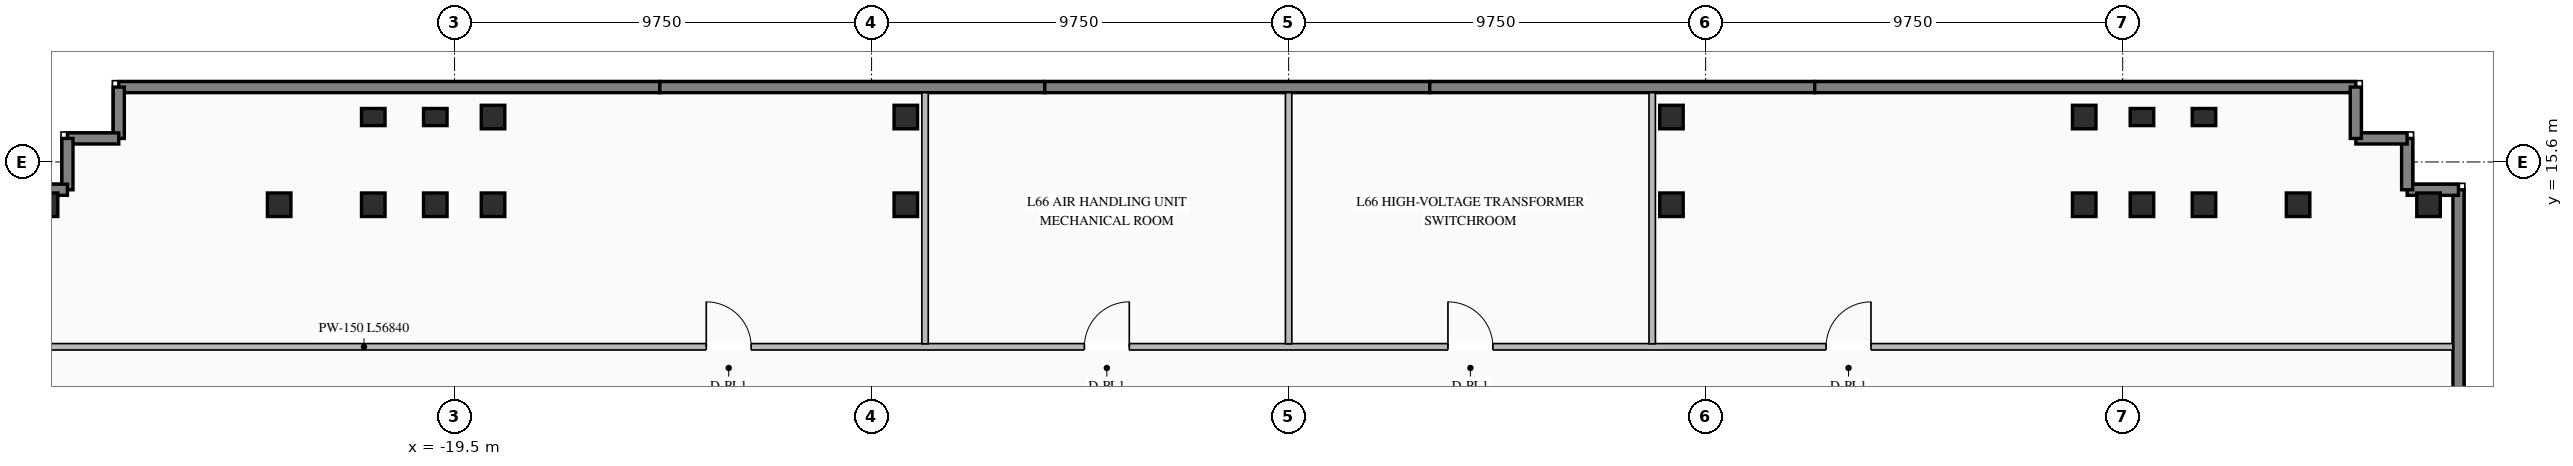
"""IFC4 building model, lengths in metres.
Left out: names, types, materials, properties, quantities, classifications, styles, units other than length and angle.
Written with IfcOpenShell. Run it as: python <this file> out.ifc"""

import sys

from ifc_helpers import new_model, si_unit, direction, frame, frame_2d, origin, origin_2d, place, context, subcontext, project, spatial, rectangle, i_section, extrude, element, fill, save


model = new_model("IFC4")
c1 = context("Model", 3, precision=1e-05, world=origin(), true_north=direction((0.0, 1.0)))
c2 = subcontext(c1, "Body", "Model", "MODEL_VIEW")
j1 = project(units=[si_unit("LENGTHUNIT", "METRE"), si_unit("PLANEANGLEUNIT", "RADIAN")], contexts=[c1])
p1 = place(None, origin())
s1 = spatial("IfcSite", under=j1, at=p1, CompositionType="ELEMENT")
p2 = place(p1, origin())
s2 = spatial("IfcBuilding", under=s1, at=p2, CompositionType="ELEMENT")
p3 = place(p2, frame((0.0, 0.0, 243.0)))
s3 = spatial("IfcBuildingStorey", under=s2, at=p3, CompositionType="ELEMENT", Elevation=243.0)
for number, where, z_axis, x_axis in (
    (1, (-21.4, 14.6, 0.0), (0.0, 0.0, 1.0), (1.0, 0.0, 0.0)),
    (2, (-19.95, 14.6, 0.0), (0.0, 0.0, 1.0), (1.0, 0.0, 0.0)),
    (3, (-18.6, 14.6, 0.0), (0.0, 0.0, 1.0), (1.0, 0.0, 0.0)),
    (4, (-8.95, 14.6, 0.0), (0.0, 0.0, 1.0), (1.0, 0.0, 0.0)),
    (5, (8.95, 14.6, 0.0), (0.0, 0.0, 1.0), (1.0, 0.0, 0.0)),
    (6, (18.6, 14.6, 0.0), (0.0, 0.0, 1.0), (1.0, 0.0, 0.0)),
    (7, (19.95, 14.6, 0.0), (0.0, 0.0, 1.0), (1.0, 0.0, 0.0)),
    (8, (21.4, 14.6, 0.0), (0.0, 0.0, 1.0), (1.0, 0.0, 0.0)),
    (9, (-23.6, 14.6, 0.0), (0.0, 0.0, 1.0), (1.0, 0.0, 0.0)),
    (10, (23.6, 14.6, 0.0), (0.0, 0.0, 1.0), (1.0, 0.0, 0.0)),
    (11, (-18.6, 16.65, 0.0), (0.0, 0.0, 1.0), (1.0, 0.0, 0.0)),
    (12, (-8.95, 16.65, 0.0), (0.0, 0.0, 1.0), (1.0, 0.0, 0.0)),
    (13, (8.95, 16.65, 0.0), (0.0, 0.0, 1.0), (1.0, 0.0, 0.0)),
    (14, (18.6, 16.65, 0.0), (0.0, 0.0, 1.0), (1.0, 0.0, 0.0)),
    (15, (-29.05, 14.6, 0.0), (0.0, 0.0, 1.0), (1.0, 0.0, 0.0)),
    (16, (26.65, 14.6, 0.0), (0.0, 0.0, 1.0), (1.0, 0.0, 0.0)),
):
    element("IfcColumn", number, at=place(p3, frame(where, z_axis=z_axis, x_axis=x_axis)), inside=s3, PredefinedType="COLUMN", context=c2, shape_type="SweptSolid", body=[
        extrude(i_section(OverallWidth=0.55, OverallDepth=0.55, WebThickness=0.024, FlangeThickness=0.036, at=origin_2d()), origin(), (0.0, 0.0, 1.0), 4.5),
    ])
for number, where, z_axis, x_axis in (
    (17, (-21.4, 16.65, 0.0), (0.0, 0.0, 1.0), (1.0, 0.0, 0.0)),
    (18, (-19.95, 16.65, 0.0), (0.0, 0.0, 1.0), (1.0, 0.0, 0.0)),
    (19, (19.95, 16.65, 0.0), (0.0, 0.0, 1.0), (1.0, 0.0, 0.0)),
    (20, (21.4, 16.65, 0.0), (0.0, 0.0, 1.0), (1.0, 0.0, 0.0)),
):
    element("IfcColumn", number, at=place(p3, frame(where, z_axis=z_axis, x_axis=x_axis)), inside=s3, PredefinedType="PILASTER", context=c2, shape_type="SweptSolid", body=[
        extrude(rectangle(XDim=0.55, YDim=0.4, at=origin_2d()), origin(), (0.0, 0.0, 1.0), 4.5),
    ])
p4 = place(p3, frame((-27.35, 17.35, 0.0), z_axis=(0.0, 0.0, 1.0), x_axis=(1.0, 0.0, 0.0)))
e21 = element("IfcWall", 21, at=p4, inside=s3, PredefinedType="STANDARD", context=c2, shape_type="SweptSolid", body=[
    extrude(rectangle(XDim=12.65, YDim=0.26, at=frame_2d((6.325, 0.0))), origin(), (0.0, 0.0, 1.0), 4.2),
])
for number, where, z_axis, x_axis in (
    (22, (-14.7, 17.35, 0.0), (0.0, 0.0, 1.0), (1.0, 0.0, 0.0)),
    (23, (-5.7, 17.35, 0.0), (0.0, 0.0, 1.0), (1.0, 0.0, 0.0)),
):
    element("IfcWall", number, at=place(p3, frame(where, z_axis=z_axis, x_axis=x_axis)), inside=s3, PredefinedType="STANDARD", context=c2, shape_type="SweptSolid", body=[
        extrude(rectangle(XDim=9.0, YDim=0.26, at=frame_2d((4.5, 0.0))), origin(), (0.0, 0.0, 1.0), 4.2),
    ])
p5 = place(p3, frame((3.3, 17.35, 0.0), z_axis=(0.0, 0.0, 1.0), x_axis=(1.0, 0.0, 0.0)))
e24 = element("IfcWall", 24, at=p5, inside=s3, PredefinedType="STANDARD", context=c2, shape_type="SweptSolid", body=[
    extrude(rectangle(XDim=9.0, YDim=0.26, at=frame_2d((4.5, 0.0))), origin(), (0.0, 0.0, 1.0), 2.395),
])
p6 = place(p3, frame((12.3, 17.35, 0.0), z_axis=(0.0, 0.0, 1.0), x_axis=(1.0, 0.0, 0.0)))
e25 = element("IfcWall", 25, at=p6, inside=s3, PredefinedType="STANDARD", context=c2, shape_type="SweptSolid", body=[
    extrude(rectangle(XDim=12.65, YDim=0.26, at=frame_2d((6.325, 0.0))), origin(), (0.0, 0.0, 1.0), 2.395),
])
p7 = place(p3, frame((27.35, 14.95, 0.0), z_axis=(0.0, 0.0, 1.0), x_axis=(0.0, -1.0, 0.0)))
e26 = element("IfcWall", 26, at=p7, inside=s3, PredefinedType="STANDARD", context=c2, shape_type="SweptSolid", body=[
    extrude(rectangle(XDim=15.85, YDim=0.26, at=frame_2d((7.925, 0.0))), origin(), (0.0, 0.0, 1.0), 4.2),
])
p8 = place(p3, frame((27.35, 14.95, 0.0), z_axis=(0.0, 0.0, 1.0), x_axis=(-1.0, 0.0, 0.0)))
e27 = element("IfcWall", 27, at=p8, inside=s3, PredefinedType="STANDARD", context=c2, shape_type="SweptSolid", body=[
    extrude(rectangle(XDim=1.2, YDim=0.26, at=frame_2d((0.6, 0.0))), origin(), (0.0, 0.0, 1.0), 2.395),
])
for number, where, z_axis, x_axis in (
    (28, (26.15, 14.95, 0.0), (0.0, 0.0, 1.0), (0.0, 1.0, 0.0)),
    (29, (26.15, 16.15, 0.0), (0.0, 0.0, 1.0), (-1.0, 0.0, 0.0)),
):
    element("IfcWall", number, at=place(p3, frame(where, z_axis=z_axis, x_axis=x_axis)), inside=s3, PredefinedType="STANDARD", context=c2, shape_type="SweptSolid", body=[
        extrude(rectangle(XDim=1.2, YDim=0.26, at=frame_2d((0.6, 0.0))), origin(), (0.0, 0.0, 1.0), 2.395),
    ])
p9 = place(p3, frame((24.95, 16.15, 0.0), z_axis=(0.0, 0.0, 1.0), x_axis=(0.0, 1.0, 0.0)))
e30 = element("IfcWall", 30, at=p9, inside=s3, PredefinedType="STANDARD", context=c2, shape_type="SweptSolid", body=[
    extrude(rectangle(XDim=1.2, YDim=0.26, at=frame_2d((0.6, 0.0))), origin(), (0.0, 0.0, 1.0), 2.395),
])
p10 = place(p3, frame((-27.35, 17.35, 0.0), z_axis=(0.0, 0.0, 1.0), x_axis=(0.0, -1.0, 0.0)))
e31 = element("IfcWall", 31, at=p10, inside=s3, PredefinedType="STANDARD", context=c2, shape_type="SweptSolid", body=[
    extrude(rectangle(XDim=1.2, YDim=0.26, at=frame_2d((0.6, 0.0))), origin(), (0.0, 0.0, 1.0), 4.2),
])
for number, where, z_axis, x_axis in (
    (32, (-27.35, 16.15, 0.0), (0.0, 0.0, 1.0), (-1.0, 0.0, 0.0)),
    (33, (-28.55, 16.15, 0.0), (0.0, 0.0, 1.0), (0.0, -1.0, 0.0)),
    (34, (-28.55, 14.95, 0.0), (0.0, 0.0, 1.0), (-1.0, 0.0, 0.0)),
):
    element("IfcWall", number, at=place(p3, frame(where, z_axis=z_axis, x_axis=x_axis)), inside=s3, PredefinedType="STANDARD", context=c2, shape_type="SweptSolid", body=[
        extrude(rectangle(XDim=1.2, YDim=0.26, at=frame_2d((0.6, 0.0))), origin(), (0.0, 0.0, 1.0), 4.2),
    ])
p11 = place(p3, frame((-29.62, 11.28, 0.0), z_axis=(0.0, 0.0, 1.0), x_axis=(1.0, 0.0, 0.0)))
e35 = element("IfcWall", 35, at=p11, inside=s3, PredefinedType="STANDARD", context=c2, shape_type="SweptSolid", body=[
    extrude(rectangle(XDim=56.84, YDim=0.15, at=frame_2d((28.42, 0.0))), origin(), (0.0, 0.0, 1.0), 4.2),
])
p12 = place(p11, frame((16.005, 0.0, 0.0)))
e36 = element("IfcOpeningElement", 36, at=p12, cuts=e35, PredefinedType="OPENING", context=c2, shape_type="SweptSolid", body=[
    extrude(rectangle(XDim=1.05, YDim=2.08, at=frame_2d((0.525, 1.04))), frame((0.0, 0.085, 0.0), z_axis=(0.0, -1.0, 0.0), x_axis=(1.0, 0.0, 0.0)), (0.0, 0.0, 1.0), 0.17),
])
p13 = place(p11, frame((24.845, 0.0, 0.0)))
e37 = element("IfcOpeningElement", 37, at=p13, cuts=e35, PredefinedType="OPENING", context=c2, shape_type="SweptSolid", body=[
    extrude(rectangle(XDim=1.05, YDim=2.08, at=frame_2d((0.525, 1.04))), frame((0.0, 0.085, 0.0), z_axis=(0.0, -1.0, 0.0), x_axis=(1.0, 0.0, 0.0)), (0.0, 0.0, 1.0), 0.17),
])
p14 = place(p11, frame((33.345, 0.0, 0.0)))
e38 = element("IfcOpeningElement", 38, at=p14, cuts=e35, PredefinedType="OPENING", context=c2, shape_type="SweptSolid", body=[
    extrude(rectangle(XDim=1.05, YDim=2.08, at=frame_2d((0.525, 1.04))), frame((0.0, 0.085, 0.0), z_axis=(0.0, -1.0, 0.0), x_axis=(1.0, 0.0, 0.0)), (0.0, 0.0, 1.0), 0.17),
])
p15 = place(p11, frame((42.185, 0.0, 0.0)))
e39 = element("IfcOpeningElement", 39, at=p15, cuts=e35, PredefinedType="OPENING", context=c2, shape_type="SweptSolid", body=[
    extrude(rectangle(XDim=1.05, YDim=2.08, at=frame_2d((0.525, 1.04))), frame((0.0, 0.085, 0.0), z_axis=(0.0, -1.0, 0.0), x_axis=(1.0, 0.0, 0.0)), (0.0, 0.0, 1.0), 0.17),
])
for number, where, z_axis, x_axis in (
    (40, (-8.5, 11.35, 0.0), (0.0, 0.0, 1.0), (0.0, 1.0, 0.0)),
    (41, (0.0, 11.35, 0.0), (0.0, 0.0, 1.0), (0.0, 1.0, 0.0)),
    (42, (8.5, 11.35, 0.0), (0.0, 0.0, 1.0), (0.0, 1.0, 0.0)),
):
    element("IfcWall", number, at=place(p3, frame(where, z_axis=z_axis, x_axis=x_axis)), inside=s3, PredefinedType="STANDARD", context=c2, shape_type="SweptSolid", body=[
        extrude(rectangle(XDim=5.87, YDim=0.15, at=frame_2d((2.935, 0.0))), origin(), (0.0, 0.0, 1.0), 4.2),
    ])
p16 = place(p12, origin())
e43 = element("IfcDoor", 43, at=p16, inside=s3, OperationType="SINGLE_SWING_LEFT", PredefinedType="DOOR", context=c2, shape_type="SweptSolid", body=[
    extrude(rectangle(XDim=1.05, YDim=2.08, at=frame_2d((0.525, 1.04))), frame((0.0, 0.025, 0.0), z_axis=(0.0, -1.0, 0.0), x_axis=(1.0, 0.0, 0.0)), (0.0, 0.0, 1.0), 0.05),
])
fill(e36, e43)
p17 = place(p13, origin())
e44 = element("IfcDoor", 44, at=p17, inside=s3, OperationType="SINGLE_SWING_RIGHT", PredefinedType="DOOR", context=c2, shape_type="SweptSolid", body=[
    extrude(rectangle(XDim=1.05, YDim=2.08, at=frame_2d((0.525, 1.04))), frame((0.0, 0.025, 0.0), z_axis=(0.0, -1.0, 0.0), x_axis=(1.0, 0.0, 0.0)), (0.0, 0.0, 1.0), 0.05),
])
fill(e37, e44)
p18 = place(p14, origin())
e45 = element("IfcDoor", 45, at=p18, inside=s3, OperationType="SINGLE_SWING_LEFT", PredefinedType="DOOR", context=c2, shape_type="SweptSolid", body=[
    extrude(rectangle(XDim=1.05, YDim=2.08, at=frame_2d((0.525, 1.04))), frame((0.0, 0.025, 0.0), z_axis=(0.0, -1.0, 0.0), x_axis=(1.0, 0.0, 0.0)), (0.0, 0.0, 1.0), 0.05),
])
fill(e38, e45)
p19 = place(p15, origin())
e46 = element("IfcDoor", 46, at=p19, inside=s3, OperationType="SINGLE_SWING_RIGHT", PredefinedType="DOOR", context=c2, shape_type="SweptSolid", body=[
    extrude(rectangle(XDim=1.05, YDim=2.08, at=frame_2d((0.525, 1.04))), frame((0.0, 0.025, 0.0), z_axis=(0.0, -1.0, 0.0), x_axis=(1.0, 0.0, 0.0)), (0.0, 0.0, 1.0), 0.05),
])
fill(e39, e46)
save(model, sys.argv[1])
